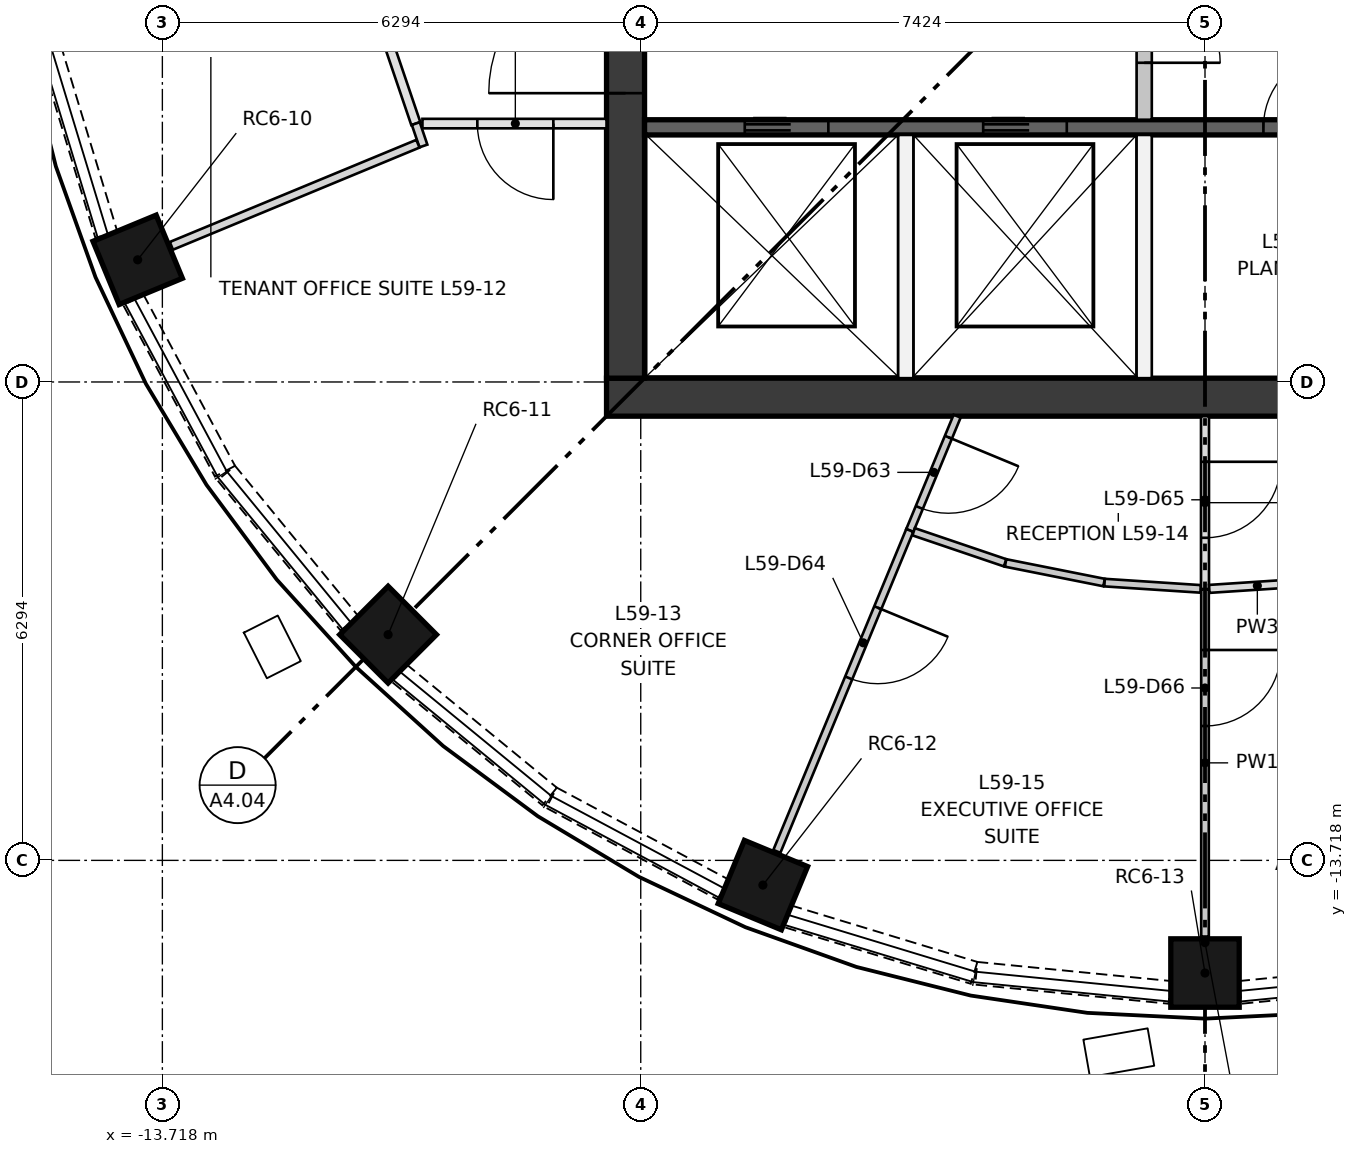
"""IFC4 building model, lengths in metres.
Left out: names, types, materials, properties, quantities, classifications, styles, units other than length and angle.
Written with IfcOpenShell. Run it as: python <this file> out.ifc"""

import sys

from ifc_helpers import new_model, si_unit, direction, frame, frame_2d, origin, origin_2d, place, context, subcontext, project, spatial, rectangle, extrude, element, fill, save


model = new_model("IFC4")
c1 = context("Model", 3, precision=1e-05, world=origin(), true_north=direction((0.0, 1.0)))
c2 = subcontext(c1, "Body", "Model", "MODEL_VIEW")
j1 = project(units=[si_unit("LENGTHUNIT", "METRE"), si_unit("PLANEANGLEUNIT", "RADIAN")], contexts=[c1])
p1 = place(None, origin())
s1 = spatial("IfcSite", under=j1, at=p1, CompositionType="ELEMENT")
p2 = place(p1, origin())
s2 = spatial("IfcBuilding", under=s1, at=p2, CompositionType="ELEMENT")
p3 = place(p2, frame((0.0, 0.0, 217.8)))
s3 = spatial("IfcBuildingStorey", under=s2, at=p3, CompositionType="ELEMENT", Elevation=217.8)
for number, where, z_axis, x_axis in (
    (1, (-14.043, -5.817, 0.5), (0.0, 0.0, 1.0), (-0.924, -0.383, 0.0)),
    (2, (-10.748, -10.748, 0.5), (0.0, 0.0, 1.0), (-0.707, -0.707, 0.0)),
    (3, (-5.817, -14.043, 0.5), (0.0, 0.0, 1.0), (-0.383, -0.924, 0.0)),
    (4, (0.0, -15.2, 0.5), (0.0, 0.0, 1.0), (0.0, -1.0, 0.0)),
):
    element("IfcColumn", number, at=place(p3, frame(where, z_axis=z_axis, x_axis=x_axis)), inside=s3, PredefinedType="COLUMN", context=c2, shape_type="SweptSolid", body=[
        extrude(rectangle(XDim=0.9, YDim=0.9, at=origin_2d()), origin(), (0.0, 0.0, 1.0), 2.85),
    ])
p4 = place(p3, frame((-7.874, -7.624, 0.0), z_axis=(0.0, 0.0, 1.0), x_axis=(1.0, 0.0, 0.0)))
e5 = element("IfcWall", 5, at=p4, inside=s3, PredefinedType="SHEAR", context=c2, shape_type="SweptSolid", body=[
    extrude(rectangle(XDim=15.748, YDim=0.5, at=frame_2d((7.874, 0.0))), origin(), (0.0, 0.0, 1.0), 3.35),
])
p5 = place(p3, frame((-7.624, -7.374, 0.0), z_axis=(0.0, 0.0, 1.0), x_axis=(0.0, 1.0, 0.0)))
e6 = element("IfcWall", 6, at=p5, inside=s3, PredefinedType="SHEAR", context=c2, shape_type="SweptSolid", body=[
    extrude(rectangle(XDim=14.748, YDim=0.5, at=frame_2d((7.374, 0.0))), origin(), (0.0, 0.0, 1.0), 3.35),
])
p6 = place(p5, frame((6.874, 0.0, 0.0)))
e7 = element("IfcOpeningElement", 7, at=p6, cuts=e6, PredefinedType="OPENING", context=c2, shape_type="SweptSolid", body=[
    extrude(rectangle(XDim=1.0, YDim=2.1, at=frame_2d((0.5, 1.05))), frame((0.0, 0.26, 0.0), z_axis=(0.0, -1.0, 0.0), x_axis=(1.0, 0.0, 0.0)), (0.0, 0.0, 1.0), 0.52),
])
p7 = place(p5, frame((3.75, 0.0, 0.0)))
e8 = element("IfcOpeningElement", 8, at=p7, cuts=e6, PredefinedType="OPENING", context=c2, shape_type="SweptSolid", body=[
    extrude(rectangle(XDim=1.8, YDim=2.1, at=frame_2d((0.9, 1.05))), frame((0.0, 0.26, 0.0), z_axis=(0.0, -1.0, 0.0), x_axis=(1.0, 0.0, 0.0)), (0.0, 0.0, 1.0), 0.52),
])
p8 = place(p5, frame((9.198, 0.0, 0.0)))
e9 = element("IfcOpeningElement", 9, at=p8, cuts=e6, PredefinedType="OPENING", context=c2, shape_type="SweptSolid", body=[
    extrude(rectangle(XDim=1.8, YDim=2.1, at=frame_2d((0.9, 1.05))), frame((0.0, 0.26, 0.0), z_axis=(0.0, -1.0, 0.0), x_axis=(1.0, 0.0, 0.0)), (0.0, 0.0, 1.0), 0.52),
])
p9 = place(p3, frame((-7.374, -4.074, 0.0), z_axis=(0.0, 0.0, 1.0), x_axis=(1.0, 0.0, 0.0)))
e10 = element("IfcWall", 10, at=p9, inside=s3, PredefinedType="SHEAR", context=c2, shape_type="SweptSolid", body=[
    extrude(rectangle(XDim=14.748, YDim=0.2, at=frame_2d((7.374, 0.0))), origin(), (0.0, 0.0, 1.0), 3.0),
])
p10 = place(p9, frame((1.319, 0.0, 0.0)))
e11 = element("IfcOpeningElement", 11, at=p10, cuts=e10, PredefinedType="OPENING", context=c2, shape_type="SweptSolid", body=[
    extrude(rectangle(XDim=1.1, YDim=2.1, at=frame_2d((0.55, 1.05))), frame((0.0, 0.11, 0.0), z_axis=(0.0, -1.0, 0.0), x_axis=(1.0, 0.0, 0.0)), (0.0, 0.0, 1.0), 0.22),
])
p11 = place(p9, frame((4.456, 0.0, 0.0)))
e12 = element("IfcOpeningElement", 12, at=p11, cuts=e10, PredefinedType="OPENING", context=c2, shape_type="SweptSolid", body=[
    extrude(rectangle(XDim=1.1, YDim=2.1, at=frame_2d((0.55, 1.05))), frame((0.0, 0.11, 0.0), z_axis=(0.0, -1.0, 0.0), x_axis=(1.0, 0.0, 0.0)), (0.0, 0.0, 1.0), 0.22),
])
p12 = place(p9, frame((8.143, 0.0, 0.0)))
e13 = element("IfcOpeningElement", 13, at=p12, cuts=e10, PredefinedType="OPENING", context=c2, shape_type="SweptSolid", body=[
    extrude(rectangle(XDim=1.0, YDim=2.1, at=frame_2d((0.5, 1.05))), frame((0.0, 0.11, 0.0), z_axis=(0.0, -1.0, 0.0), x_axis=(1.0, 0.0, 0.0)), (0.0, 0.0, 1.0), 0.22),
])
p13 = place(p9, frame((12.379, 0.0, 0.0)))
e14 = element("IfcOpeningElement", 14, at=p13, cuts=e10, PredefinedType="OPENING", context=c2, shape_type="SweptSolid", body=[
    extrude(rectangle(XDim=0.8, YDim=2.1, at=frame_2d((0.4, 1.05))), frame((0.0, 0.11, 0.0), z_axis=(0.0, -1.0, 0.0), x_axis=(1.0, 0.0, 0.0)), (0.0, 0.0, 1.0), 0.22),
])
for number, where, z_axis, x_axis in (
    (15, (-3.937, -7.374, 0.0), (0.0, 0.0, 1.0), (0.0, 1.0, 0.0)),
    (16, (-0.8, -7.374, 0.0), (0.0, 0.0, 1.0), (0.0, 1.0, 0.0)),
):
    element("IfcWall", number, at=place(p3, frame(where, z_axis=z_axis, x_axis=x_axis)), inside=s3, PredefinedType="PARTITIONING", context=c2, shape_type="SweptSolid", body=[
        extrude(rectangle(XDim=3.2, YDim=0.2, at=frame_2d((1.6, 0.0))), origin(), (0.0, 0.0, 1.0), 3.0),
    ])
p14 = place(p3, frame((-0.8, -3.974, 0.0), z_axis=(0.0, 0.0, 1.0), x_axis=(0.0, 1.0, 0.0)))
e17 = element("IfcWall", 17, at=p14, inside=s3, PredefinedType="PARTITIONING", context=c2, shape_type="SweptSolid", body=[
    extrude(rectangle(XDim=2.499, YDim=0.2, at=frame_2d((1.25, 0.0))), origin(), (0.0, 0.0, 1.0), 3.0),
])
p15 = place(p14, frame((0.75, 0.0, 0.0)))
e18 = element("IfcOpeningElement", 18, at=p15, cuts=e17, PredefinedType="OPENING", context=c2, shape_type="SweptSolid", body=[
    extrude(rectangle(XDim=1.0, YDim=2.1, at=frame_2d((0.5, 1.05))), frame((0.0, 0.11, 0.0), z_axis=(0.0, -1.0, 0.0), x_axis=(1.0, 0.0, 0.0)), (0.0, 0.0, 1.0), 0.22),
])
p16 = place(p3, frame((-15.198, -3.038, 0.0), z_axis=(0.0, 0.0, 1.0), x_axis=(0.290219358397, -0.956960147557, 0.0)))
e19 = element("IfcWall", 19, at=p16, inside=s3, PredefinedType="SOLIDWALL", context=c2, shape_type="SweptSolid", body=[
    extrude(rectangle(XDim=2.557, YDim=0.3, at=frame_2d((1.279, 0.0))), origin(), (0.0, 0.0, 1.0), 0.9),
])
p17 = place(p3, frame((-14.1, -6.343, 0.0), z_axis=(0.0, 0.0, 1.0), x_axis=(0.471603904468, -0.881810499649, 0.0)))
e20 = element("IfcWall", 20, at=p17, inside=s3, PredefinedType="SOLIDWALL", context=c2, shape_type="SweptSolid", body=[
    extrude(rectangle(XDim=2.557, YDim=0.3, at=frame_2d((1.278, 0.0))), origin(), (0.0, 0.0, 1.0), 0.9),
])
for number, where, z_axis, x_axis in (
    (21, (-12.877, -8.623, 0.0), (0.0, 0.0, 1.0), (0.634, -0.773, 0.0)),
    (22, (-10.6, -11.256, 0.0), (0.0, 0.0, 1.0), (0.773, -0.634, 0.0)),
):
    element("IfcWall", number, at=place(p3, frame(where, z_axis=z_axis, x_axis=x_axis)), inside=s3, PredefinedType="SOLIDWALL", context=c2, shape_type="SweptSolid", body=[
        extrude(rectangle(XDim=2.558, YDim=0.3, at=frame_2d((1.279, 0.0))), origin(), (0.0, 0.0, 1.0), 0.9),
    ])
p18 = place(p3, frame((-8.598, -12.894, 0.0), z_axis=(0.0, 0.0, 1.0), x_axis=(0.881810499649, -0.471603904468, 0.0)))
e23 = element("IfcWall", 23, at=p18, inside=s3, PredefinedType="SOLIDWALL", context=c2, shape_type="SweptSolid", body=[
    extrude(rectangle(XDim=2.557, YDim=0.3, at=frame_2d((1.278, 0.0))), origin(), (0.0, 0.0, 1.0), 0.9),
])
p19 = place(p3, frame((-5.486, -14.455, 0.0), z_axis=(0.0, 0.0, 1.0), x_axis=(0.956960147557, -0.290219358397, 0.0)))
e24 = element("IfcWall", 24, at=p19, inside=s3, PredefinedType="SOLIDWALL", context=c2, shape_type="SweptSolid", body=[
    extrude(rectangle(XDim=2.557, YDim=0.3, at=frame_2d((1.279, 0.0))), origin(), (0.0, 0.0, 1.0), 0.9),
])
for number, where, z_axis, x_axis in (
    (25, (-3.009, -15.204, 0.0), (0.0, 0.0, 1.0), (0.995, -0.098, 0.0)),
    (26, (0.464, -15.455, 0.0), (0.0, 0.0, 1.0), (0.995, 0.098, 0.0)),
):
    element("IfcWall", number, at=place(p3, frame(where, z_axis=z_axis, x_axis=x_axis)), inside=s3, PredefinedType="SOLIDWALL", context=c2, shape_type="SweptSolid", body=[
        extrude(rectangle(XDim=2.558, YDim=0.3, at=frame_2d((1.279, 0.0))), origin(), (0.0, 0.0, 1.0), 0.9),
    ])
p20 = place(p3, frame((-10.384, -4.024, 0.0), z_axis=(0.0, 0.0, 1.0), x_axis=(-0.321479033524, 0.946916696972, 0.0)))
e27 = element("IfcWall", 27, at=p20, inside=s3, PredefinedType="PARTITIONING", context=c2, shape_type="SweptSolid", body=[
    extrude(rectangle(XDim=1.198, YDim=0.125, at=frame_2d((0.599, 0.0))), origin(), (0.0, 0.0, 1.0), 3.0),
])
p21 = place(p3, frame((-7.874, -4.024, 0.0), z_axis=(0.0, 0.0, 1.0), x_axis=(-1.0, 0.0, 0.0)))
e28 = element("IfcWall", 28, at=p21, inside=s3, PredefinedType="PARTITIONING", context=c2, shape_type="SweptSolid", body=[
    extrude(rectangle(XDim=2.422, YDim=0.125, at=frame_2d((1.211, 0.0))), origin(), (0.0, 0.0, 1.0), 3.0),
])
p22 = place(p21, frame((0.7, 0.0, 0.0)))
e29 = element("IfcOpeningElement", 29, at=p22, cuts=e28, PredefinedType="OPENING", context=c2, shape_type="SweptSolid", body=[
    extrude(rectangle(XDim=1.0, YDim=2.1, at=frame_2d((0.5, 1.05))), frame((0.0, 0.073, 0.0), z_axis=(0.0, -1.0, 0.0), x_axis=(1.0, 0.0, 0.0)), (0.0, 0.0, 1.0), 0.145),
])
p23 = place(p3, frame((-10.384, -4.024, 0.0), z_axis=(0.0, 0.0, 1.0), x_axis=(0.320931919594, -0.947102266382, 0.0)))
e30 = element("IfcWall", 30, at=p23, inside=s3, PredefinedType="PARTITIONING", context=c2, shape_type="SweptSolid", body=[
    extrude(rectangle(XDim=0.311, YDim=0.11, at=frame_2d((0.156, 0.0))), origin(), (0.0, 0.0, 1.0), 3.0),
])
p24 = place(p3, frame((-10.356, -4.289, 0.0), z_axis=(0.0, 0.0, 1.0), x_axis=(-0.923871065891, -0.382703871955, 0.0)))
e31 = element("IfcWall", 31, at=p24, inside=s3, PredefinedType="PARTITIONING", context=c2, shape_type="SweptSolid", body=[
    extrude(rectangle(XDim=3.511, YDim=0.11, at=frame_2d((1.756, 0.0))), origin(), (0.0, 0.0, 1.0), 3.0),
])
p25 = place(p3, frame((-3.261, -7.874, 0.0), z_axis=(0.0, 0.0, 1.0), x_axis=(-0.382718376354, -0.923865057463, 0.0)))
e32 = element("IfcWall", 32, at=p25, inside=s3, PredefinedType="PARTITIONING", context=c2, shape_type="SweptSolid", body=[
    extrude(rectangle(XDim=1.627, YDim=0.1, at=frame_2d((0.813, 0.0))), origin(), (0.0, 0.0, 1.0), 3.0),
])
p26 = place(p25, frame((0.3, 0.0, 0.0)))
e33 = element("IfcOpeningElement", 33, at=p26, cuts=e32, PredefinedType="OPENING", context=c2, shape_type="SweptSolid", body=[
    extrude(rectangle(XDim=1.0, YDim=2.1, at=frame_2d((0.5, 1.05))), frame((0.0, 0.06, 0.0), z_axis=(0.0, -1.0, 0.0), x_axis=(1.0, 0.0, 0.0)), (0.0, 0.0, 1.0), 0.12),
])
p27 = place(p3, frame((-3.884, -9.377, 0.0), z_axis=(0.0, 0.0, 1.0), x_axis=(-0.382664766489, -0.923887263949, 0.0)))
e34 = element("IfcWall", 34, at=p27, inside=s3, PredefinedType="PARTITIONING", context=c2, shape_type="SweptSolid", body=[
    extrude(rectangle(XDim=4.57, YDim=0.1, at=frame_2d((2.285, 0.0))), origin(), (0.0, 0.0, 1.0), 3.0),
])
p28 = place(p27, frame((1.1, 0.0, 0.0)))
e35 = element("IfcOpeningElement", 35, at=p28, cuts=e34, PredefinedType="OPENING", context=c2, shape_type="SweptSolid", body=[
    extrude(rectangle(XDim=1.0, YDim=2.1, at=frame_2d((0.5, 1.05))), frame((0.0, 0.06, 0.0), z_axis=(0.0, -1.0, 0.0), x_axis=(1.0, 0.0, 0.0)), (0.0, 0.0, 1.0), 0.12),
])
p29 = place(p3, frame((-2.63, -9.803, 0.0), z_axis=(0.0, 0.0, 1.0), x_axis=(-0.946940072487, 0.321410172706, 0.0)))
e36 = element("IfcWall", 36, at=p29, inside=s3, PredefinedType="PARTITIONING", context=c2, shape_type="SweptSolid", body=[
    extrude(rectangle(XDim=1.271, YDim=0.1, at=frame_2d((0.635, 0.0))), origin(), (0.0, 0.0, 1.0), 3.0),
])
p30 = place(p3, frame((-1.328, -10.062, 0.0), z_axis=(0.0, 0.0, 1.0), x_axis=(-0.980779158075, 0.195121098517, 0.0)))
e37 = element("IfcWall", 37, at=p30, inside=s3, PredefinedType="PARTITIONING", context=c2, shape_type="SweptSolid", body=[
    extrude(rectangle(XDim=1.321, YDim=0.1, at=frame_2d((0.661, 0.0))), origin(), (0.0, 0.0, 1.0), 3.0),
])
p31 = place(p3, frame((-0.056, -10.146, 0.0), z_axis=(0.0, 0.0, 1.0), x_axis=(-0.997868677089, 0.065254143814, 0.0)))
e38 = element("IfcWall", 38, at=p31, inside=s3, PredefinedType="PARTITIONING", context=c2, shape_type="SweptSolid", body=[
    extrude(rectangle(XDim=1.268, YDim=0.1, at=frame_2d((0.634, 0.0))), origin(), (0.0, 0.0, 1.0), 3.0),
])
p32 = place(p3, frame((0.0, -7.874, 0.0), z_axis=(0.0, 0.0, 1.0), x_axis=(0.0, -1.0, 0.0)))
e39 = element("IfcWall", 39, at=p32, inside=s3, PredefinedType="PARTITIONING", context=c2, shape_type="SweptSolid", body=[
    extrude(rectangle(XDim=2.276, YDim=0.105, at=frame_2d((1.138, 0.0))), origin(), (0.0, 0.0, 1.0), 3.0),
])
p33 = place(p32, frame((0.6, 0.0, 0.0)))
e40 = element("IfcOpeningElement", 40, at=p33, cuts=e39, PredefinedType="OPENING", context=c2, shape_type="SweptSolid", body=[
    extrude(rectangle(XDim=1.0, YDim=2.1, at=frame_2d((0.5, 1.05))), frame((0.0, 0.062, 0.0), z_axis=(0.0, -1.0, 0.0), x_axis=(1.0, 0.0, 0.0)), (0.0, 0.0, 1.0), 0.125),
])
p34 = place(p3, frame((0.0, -10.15, 0.0), z_axis=(0.0, 0.0, 1.0), x_axis=(0.0, -1.0, 0.0)))
e41 = element("IfcWall", 41, at=p34, inside=s3, PredefinedType="PARTITIONING", context=c2, shape_type="SweptSolid", body=[
    extrude(rectangle(XDim=4.57, YDim=0.1, at=frame_2d((2.285, 0.0))), origin(), (0.0, 0.0, 1.0), 3.0),
])
p35 = place(p34, frame((0.8, 0.0, 0.0)))
e42 = element("IfcOpeningElement", 42, at=p35, cuts=e41, PredefinedType="OPENING", context=c2, shape_type="SweptSolid", body=[
    extrude(rectangle(XDim=1.0, YDim=2.1, at=frame_2d((0.5, 1.05))), frame((0.0, 0.06, 0.0), z_axis=(0.0, -1.0, 0.0), x_axis=(1.0, 0.0, 0.0)), (0.0, 0.0, 1.0), 0.12),
])
p36 = place(p3, frame((1.321, -10.063, 0.0), z_axis=(0.0, 0.0, 1.0), x_axis=(-0.99786785721, -0.065266680223, 0.0)))
e43 = element("IfcWall", 43, at=p36, inside=s3, PredefinedType="PARTITIONING", context=c2, shape_type="SweptSolid", body=[
    extrude(rectangle(XDim=1.268, YDim=0.105, at=frame_2d((0.634, 0.0))), origin(), (0.0, 0.0, 1.0), 3.0),
])
p37 = place(p10, origin())
e44 = element("IfcDoor", 44, at=p37, inside=s3, OperationType="DOUBLE_DOOR_SLIDING", PredefinedType="DOOR", context=c2, shape_type="SweptSolid", body=[
    extrude(rectangle(XDim=1.1, YDim=2.1, at=frame_2d((0.55, 1.05))), frame((0.0, 0.025, 0.0), z_axis=(0.0, -1.0, 0.0), x_axis=(1.0, 0.0, 0.0)), (0.0, 0.0, 1.0), 0.05),
])
fill(e11, e44)
p38 = place(p11, origin())
e45 = element("IfcDoor", 45, at=p38, inside=s3, OperationType="DOUBLE_DOOR_SLIDING", PredefinedType="DOOR", context=c2, shape_type="SweptSolid", body=[
    extrude(rectangle(XDim=1.1, YDim=2.1, at=frame_2d((0.55, 1.05))), frame((0.0, 0.025, 0.0), z_axis=(0.0, -1.0, 0.0), x_axis=(1.0, 0.0, 0.0)), (0.0, 0.0, 1.0), 0.05),
])
fill(e12, e45)
p39 = place(p15, frame((1.0, 0.0, 0.0), z_axis=(0.0, 0.0, 1.0), x_axis=(-1.0, 0.0, 0.0)))
e46 = element("IfcDoor", 46, at=p39, inside=s3, OperationType="SINGLE_SWING_LEFT", PredefinedType="DOOR", context=c2, shape_type="SweptSolid", body=[
    extrude(rectangle(XDim=1.0, YDim=2.1, at=frame_2d((0.5, 1.05))), frame((0.0, 0.025, 0.0), z_axis=(0.0, -1.0, 0.0), x_axis=(1.0, 0.0, 0.0)), (0.0, 0.0, 1.0), 0.05),
])
fill(e18, e46)
p40 = place(p12, origin())
e47 = element("IfcDoor", 47, at=p40, inside=s3, OperationType="SINGLE_SWING_RIGHT", PredefinedType="DOOR", context=c2, shape_type="SweptSolid", body=[
    extrude(rectangle(XDim=1.0, YDim=2.1, at=frame_2d((0.5, 1.05))), frame((0.0, 0.025, 0.0), z_axis=(0.0, -1.0, 0.0), x_axis=(1.0, 0.0, 0.0)), (0.0, 0.0, 1.0), 0.05),
])
fill(e13, e47)
p41 = place(p7, origin())
e48 = element("IfcDoor", 48, at=p41, inside=s3, OperationType="DOUBLE_DOOR_SINGLE_SWING", PredefinedType="DOOR", context=c2, shape_type="SweptSolid", body=[
    extrude(rectangle(XDim=1.8, YDim=2.1, at=frame_2d((0.9, 1.05))), frame((0.0, 0.025, 0.0), z_axis=(0.0, -1.0, 0.0), x_axis=(1.0, 0.0, 0.0)), (0.0, 0.0, 1.0), 0.05),
])
fill(e8, e48)
p42 = place(p22, origin())
e49 = element("IfcDoor", 49, at=p42, inside=s3, OperationType="SINGLE_SWING_LEFT", PredefinedType="DOOR", context=c2, shape_type="SweptSolid", body=[
    extrude(rectangle(XDim=1.0, YDim=2.1, at=frame_2d((0.5, 1.05))), frame((0.0, 0.025, 0.0), z_axis=(0.0, -1.0, 0.0), x_axis=(1.0, 0.0, 0.0)), (0.0, 0.0, 1.0), 0.05),
])
fill(e29, e49)
p43 = place(p26, origin())
e50 = element("IfcDoor", 50, at=p43, inside=s3, OperationType="SINGLE_SWING_LEFT", PredefinedType="DOOR", context=c2, shape_type="SweptSolid", body=[
    extrude(rectangle(XDim=1.0, YDim=2.1, at=frame_2d((0.5, 1.05))), frame((0.0, 0.025, 0.0), z_axis=(0.0, -1.0, 0.0), x_axis=(1.0, 0.0, 0.0)), (0.0, 0.0, 1.0), 0.05),
])
fill(e33, e50)
p44 = place(p28, origin())
e51 = element("IfcDoor", 51, at=p44, inside=s3, OperationType="SINGLE_SWING_LEFT", PredefinedType="DOOR", context=c2, shape_type="SweptSolid", body=[
    extrude(rectangle(XDim=1.0, YDim=2.1, at=frame_2d((0.5, 1.05))), frame((0.0, 0.025, 0.0), z_axis=(0.0, -1.0, 0.0), x_axis=(1.0, 0.0, 0.0)), (0.0, 0.0, 1.0), 0.05),
])
fill(e35, e51)
p45 = place(p33, origin())
e52 = element("IfcDoor", 52, at=p45, inside=s3, OperationType="SINGLE_SWING_LEFT", PredefinedType="DOOR", context=c2, shape_type="SweptSolid", body=[
    extrude(rectangle(XDim=1.0, YDim=2.1, at=frame_2d((0.5, 1.05))), frame((0.0, 0.025, 0.0), z_axis=(0.0, -1.0, 0.0), x_axis=(1.0, 0.0, 0.0)), (0.0, 0.0, 1.0), 0.05),
])
fill(e40, e52)
p46 = place(p35, origin())
e53 = element("IfcDoor", 53, at=p46, inside=s3, OperationType="SINGLE_SWING_LEFT", PredefinedType="DOOR", context=c2, shape_type="SweptSolid", body=[
    extrude(rectangle(XDim=1.0, YDim=2.1, at=frame_2d((0.5, 1.05))), frame((0.0, 0.025, 0.0), z_axis=(0.0, -1.0, 0.0), x_axis=(1.0, 0.0, 0.0)), (0.0, 0.0, 1.0), 0.05),
])
fill(e42, e53)
save(model, sys.argv[1])
